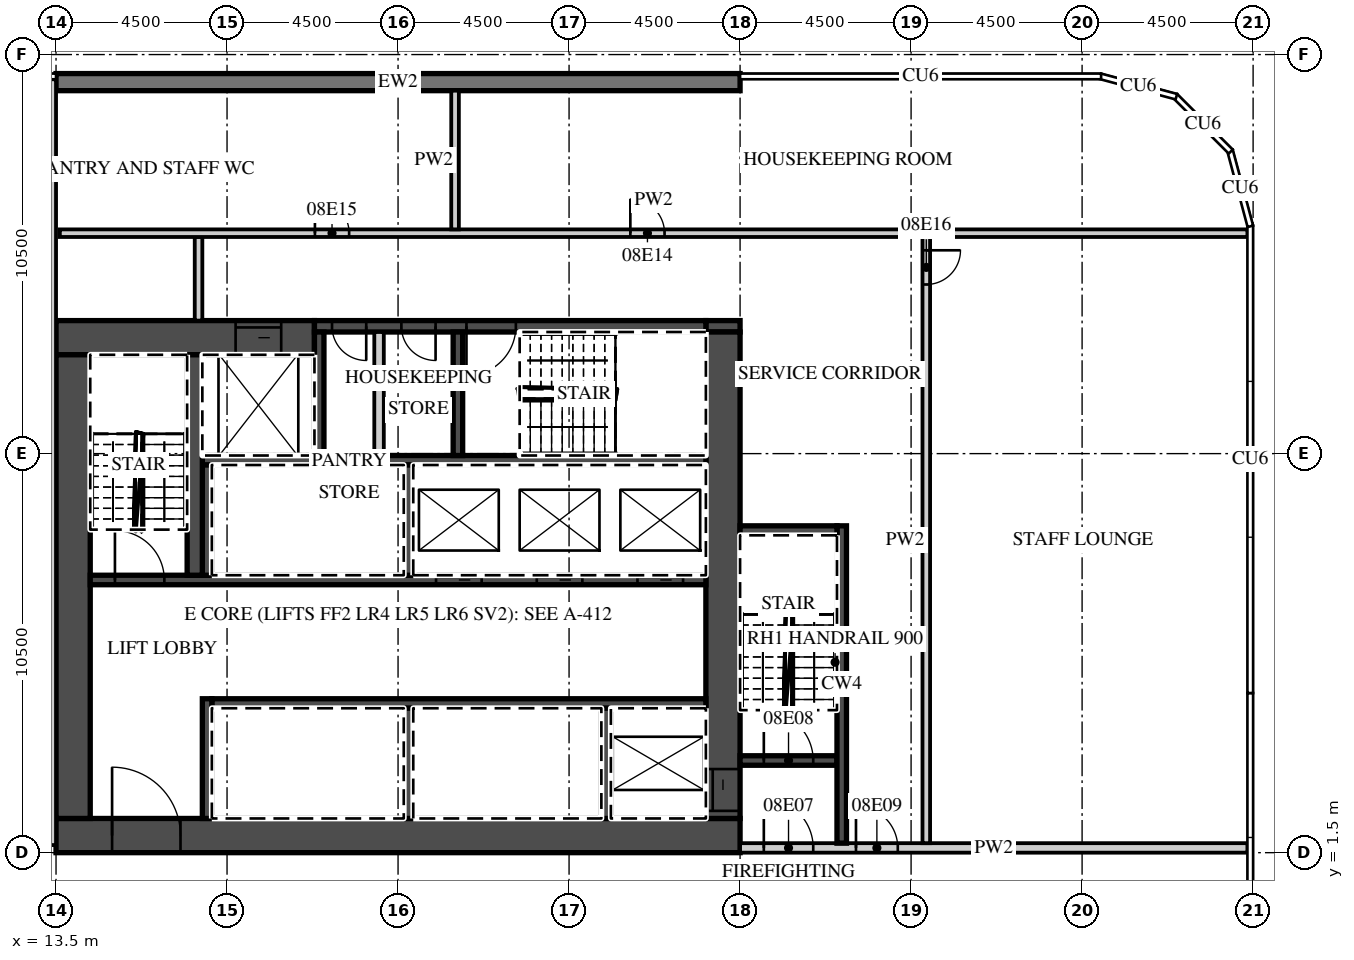
"""IFC4 building model, lengths in metres.
Left out: names, types, materials, properties, quantities, classifications, styles, units other than length and angle.
Written with IfcOpenShell. Run it as: python <this file> out.ifc"""

import sys

from ifc_helpers import new_model, si_unit, direction, frame, frame_2d, origin, place, context, subcontext, project, spatial, rectangle, extrude, element, fill, save


model = new_model("IFC4")
c1 = context("Model", 3, precision=1e-05, world=origin(), true_north=direction((0.0, 1.0)))
c2 = subcontext(c1, "Body", "Model", "MODEL_VIEW")
j1 = project(units=[si_unit("LENGTHUNIT", "METRE"), si_unit("PLANEANGLEUNIT", "RADIAN")], contexts=[c1])
p1 = place(None, origin())
s1 = spatial("IfcSite", under=j1, at=p1, CompositionType="ELEMENT")
p2 = place(p1, origin())
s2 = spatial("IfcBuilding", under=s1, at=p2, CompositionType="ELEMENT")
p3 = place(p2, frame((0.0, 0.0, 53.0)))
s3 = spatial("IfcBuildingStorey", under=s2, at=p3, CompositionType="ELEMENT", Elevation=53.0)
p4 = place(p3, frame((31.5, 21.775, 0.0), z_axis=(0.0, 0.0, 1.0), x_axis=(-1.0, 0.0, 0.0)))
e1 = element("IfcWall", 1, at=p4, inside=s3, PredefinedType="SOLIDWALL", context=c2, shape_type="SweptSolid", body=[
    extrude(rectangle(XDim=18.0, YDim=0.45, at=frame_2d((9.0, 0.0))), origin(), (0.0, 0.0, 1.0), 6.72),
])
p5 = place(p3, frame((13.5, 1.95, 0.0), z_axis=(0.0, 0.0, 1.0), x_axis=(1.0, 0.0, 0.0)))
e2 = element("IfcWall", 2, at=p5, inside=s3, PredefinedType="SHEAR", context=c2, shape_type="SweptSolid", body=[
    extrude(rectangle(XDim=18.0, YDim=0.9, at=frame_2d((9.0, 0.0))), origin(), (0.0, 0.0, 1.0), 6.72),
])
p6 = place(p5, frame((1.475, 0.0, 0.0)))
e3 = element("IfcOpeningElement", 3, at=p6, cuts=e2, PredefinedType="OPENING", context=c2, shape_type="SweptSolid", body=[
    extrude(rectangle(XDim=1.8, YDim=2.1, at=frame_2d((0.9, 1.05))), frame((0.0, 0.46, 0.0), z_axis=(0.0, -1.0, 0.0), x_axis=(1.0, 0.0, 0.0)), (0.0, 0.0, 1.0), 0.92),
])
p7 = place(p3, frame((13.5, 15.05, 0.0), z_axis=(0.0, 0.0, 1.0), x_axis=(1.0, 0.0, 0.0)))
e4 = element("IfcWall", 4, at=p7, inside=s3, PredefinedType="SHEAR", context=c2, shape_type="SweptSolid", body=[
    extrude(rectangle(XDim=6.8, YDim=0.9, at=frame_2d((3.4, 0.0))), origin(), (0.0, 0.0, 1.0), 6.72),
])
p8 = place(p7, frame((4.725, 0.0, 0.0)))
e5 = element("IfcOpeningElement", 5, at=p8, cuts=e4, PredefinedType="OPENING", context=c2, shape_type="SweptSolid", body=[
    extrude(rectangle(XDim=1.2, YDim=2.1, at=frame_2d((0.6, 1.05))), frame((0.0, 0.46, 0.0), z_axis=(0.0, -1.0, 0.0), x_axis=(1.0, 0.0, 0.0)), (0.0, 0.0, 1.0), 0.92),
])
p9 = place(p3, frame((30.6, 15.35, 0.0), z_axis=(0.0, 0.0, 1.0), x_axis=(1.0, 0.0, 0.0)))
e6 = element("IfcWall", 6, at=p9, inside=s3, PredefinedType="SHEAR", context=c2, shape_type="SweptSolid", body=[
    extrude(rectangle(XDim=0.9, YDim=0.3, at=frame_2d((0.45, 0.0))), origin(), (0.0, 0.0, 1.0), 6.72),
])
p10 = place(p3, frame((20.3, 15.35, 0.0), z_axis=(0.0, 0.0, 1.0), x_axis=(1.0, 0.0, 0.0)))
e7 = element("IfcWall", 7, at=p10, inside=s3, PredefinedType="SHEAR", context=c2, shape_type="SweptSolid", body=[
    extrude(rectangle(XDim=10.3, YDim=0.3, at=frame_2d((5.15, 0.0))), origin(), (0.0, 0.0, 1.0), 6.72),
])
p11 = place(p10, frame((4.0, 0.0, 0.0)))
e8 = element("IfcOpeningElement", 8, at=p11, cuts=e7, PredefinedType="OPENING", context=c2, shape_type="SweptSolid", body=[
    extrude(rectangle(XDim=1.3, YDim=2.1, at=frame_2d((0.65, 1.05))), frame((0.0, 0.16, 0.0), z_axis=(0.0, -1.0, 0.0), x_axis=(1.0, 0.0, 0.0)), (0.0, 0.0, 1.0), 0.32),
])
p12 = place(p10, frame((2.288, 0.0, 0.0)))
e9 = element("IfcOpeningElement", 9, at=p12, cuts=e7, PredefinedType="OPENING", context=c2, shape_type="SweptSolid", body=[
    extrude(rectangle(XDim=0.9, YDim=2.1, at=frame_2d((0.45, 1.05))), frame((0.0, 0.16, 0.0), z_axis=(0.0, -1.0, 0.0), x_axis=(1.0, 0.0, 0.0)), (0.0, 0.0, 1.0), 0.32),
])
p13 = place(p10, frame((0.462, 0.0, 0.0)))
e10 = element("IfcOpeningElement", 10, at=p13, cuts=e7, PredefinedType="OPENING", context=c2, shape_type="SweptSolid", body=[
    extrude(rectangle(XDim=0.9, YDim=2.1, at=frame_2d((0.45, 1.05))), frame((0.0, 0.16, 0.0), z_axis=(0.0, -1.0, 0.0), x_axis=(1.0, 0.0, 0.0)), (0.0, 0.0, 1.0), 0.32),
])
p14 = place(p3, frame((31.05, 2.4, 0.0), z_axis=(0.0, 0.0, 1.0), x_axis=(0.0, 1.0, 0.0)))
e11 = element("IfcWall", 11, at=p14, inside=s3, PredefinedType="SHEAR", context=c2, shape_type="SweptSolid", body=[
    extrude(rectangle(XDim=12.8, YDim=0.9, at=frame_2d((6.4, 0.0))), origin(), (0.0, 0.0, 1.0), 6.72),
])
p15 = place(p14, frame((0.2, 0.0, 0.0)))
e12 = element("IfcOpeningElement", 12, at=p15, cuts=e11, PredefinedType="OPENING", context=c2, shape_type="SweptSolid", body=[
    extrude(rectangle(XDim=1.1, YDim=2.1, at=frame_2d((0.55, 1.05))), frame((0.0, 0.46, 0.0), z_axis=(0.0, -1.0, 0.0), x_axis=(1.0, 0.0, 0.0)), (0.0, 0.0, 1.0), 0.92),
])
p16 = place(p3, frame((13.95, 2.4, 0.0), z_axis=(0.0, 0.0, 1.0), x_axis=(0.0, 1.0, 0.0)))
e13 = element("IfcWall", 13, at=p16, inside=s3, PredefinedType="SHEAR", context=c2, shape_type="SweptSolid", body=[
    extrude(rectangle(XDim=12.2, YDim=0.9, at=frame_2d((6.1, 0.0))), origin(), (0.0, 0.0, 1.0), 6.72),
])
p17 = place(p3, frame((17.6, 5.425, 0.0), z_axis=(0.0, 0.0, 1.0), x_axis=(1.0, 0.0, 0.0)))
e14 = element("IfcWall", 14, at=p17, inside=s3, PredefinedType="SHEAR", context=c2, shape_type="SweptSolid", body=[
    extrude(rectangle(XDim=13.0, YDim=0.25, at=frame_2d((6.5, 0.0))), origin(), (0.0, 0.0, 1.0), 6.72),
])
p18 = place(p3, frame((17.475, 2.4, 0.0), z_axis=(0.0, 0.0, 1.0), x_axis=(0.0, 1.0, 0.0)))
e15 = element("IfcWall", 15, at=p18, inside=s3, PredefinedType="SHEAR", context=c2, shape_type="SweptSolid", body=[
    extrude(rectangle(XDim=3.15, YDim=0.25, at=frame_2d((1.575, 0.0))), origin(), (0.0, 0.0, 1.0), 6.72),
])
for number, where, z_axis, x_axis in (
    (16, (27.975, 2.4, 0.0), (0.0, 0.0, 1.0), (0.0, 1.0, 0.0)),
    (17, (22.775, 2.4, 0.0), (0.0, 0.0, 1.0), (0.0, 1.0, 0.0)),
):
    element("IfcWall", number, at=place(p3, frame(where, z_axis=z_axis, x_axis=x_axis)), inside=s3, PredefinedType="SHEAR", context=c2, shape_type="SweptSolid", body=[
        extrude(rectangle(XDim=2.9, YDim=0.25, at=frame_2d((1.45, 0.0))), origin(), (0.0, 0.0, 1.0), 6.72),
    ])
p19 = place(p3, frame((14.4, 8.675, 0.0), z_axis=(0.0, 0.0, 1.0), x_axis=(1.0, 0.0, 0.0)))
e18 = element("IfcWall", 18, at=p19, inside=s3, PredefinedType="SHEAR", context=c2, shape_type="SweptSolid", body=[
    extrude(rectangle(XDim=16.2, YDim=0.25, at=frame_2d((8.1, 0.0))), origin(), (0.0, 0.0, 1.0), 6.72),
])
p20 = place(p19, frame((14.4, 0.0, 0.0)))
e19 = element("IfcOpeningElement", 19, at=p20, cuts=e18, PredefinedType="OPENING", context=c2, shape_type="SweptSolid", body=[
    extrude(rectangle(XDim=1.2, YDim=2.1, at=frame_2d((0.6, 1.05))), frame((0.0, 0.135, 0.0), z_axis=(0.0, -1.0, 0.0), x_axis=(1.0, 0.0, 0.0)), (0.0, 0.0, 1.0), 0.27),
])
p21 = place(p19, frame((11.75, 0.0, 0.0)))
e20 = element("IfcOpeningElement", 20, at=p21, cuts=e18, PredefinedType="OPENING", context=c2, shape_type="SweptSolid", body=[
    extrude(rectangle(XDim=1.2, YDim=2.1, at=frame_2d((0.6, 1.05))), frame((0.0, 0.135, 0.0), z_axis=(0.0, -1.0, 0.0), x_axis=(1.0, 0.0, 0.0)), (0.0, 0.0, 1.0), 0.27),
])
p22 = place(p19, frame((9.1, 0.0, 0.0)))
e21 = element("IfcOpeningElement", 21, at=p22, cuts=e18, PredefinedType="OPENING", context=c2, shape_type="SweptSolid", body=[
    extrude(rectangle(XDim=1.2, YDim=2.1, at=frame_2d((0.6, 1.05))), frame((0.0, 0.135, 0.0), z_axis=(0.0, -1.0, 0.0), x_axis=(1.0, 0.0, 0.0)), (0.0, 0.0, 1.0), 0.27),
])
p23 = place(p19, frame((0.65, 0.0, 0.0)))
e22 = element("IfcOpeningElement", 22, at=p23, cuts=e18, PredefinedType="OPENING", context=c2, shape_type="SweptSolid", body=[
    extrude(rectangle(XDim=1.3, YDim=2.1, at=frame_2d((0.65, 1.05))), frame((0.0, 0.135, 0.0), z_axis=(0.0, -1.0, 0.0), x_axis=(1.0, 0.0, 0.0)), (0.0, 0.0, 1.0), 0.27),
])
p24 = place(p3, frame((17.35, 11.825, 0.0), z_axis=(0.0, 0.0, 1.0), x_axis=(1.0, 0.0, 0.0)))
e23 = element("IfcWall", 23, at=p24, inside=s3, PredefinedType="SHEAR", context=c2, shape_type="SweptSolid", body=[
    extrude(rectangle(XDim=13.25, YDim=0.25, at=frame_2d((6.625, 0.0))), origin(), (0.0, 0.0, 1.0), 6.72),
])
for number, where, z_axis, x_axis in (
    (24, (17.475, 8.8, 0.0), (0.0, 0.0, 1.0), (0.0, 1.0, 0.0)),
    (25, (22.775, 8.8, 0.0), (0.0, 0.0, 1.0), (0.0, 1.0, 0.0)),
):
    element("IfcWall", number, at=place(p3, frame(where, z_axis=z_axis, x_axis=x_axis)), inside=s3, PredefinedType="SHEAR", context=c2, shape_type="SweptSolid", body=[
        extrude(rectangle(XDim=2.9, YDim=0.25, at=frame_2d((1.45, 0.0))), origin(), (0.0, 0.0, 1.0), 6.72),
    ])
p25 = place(p3, frame((17.15, 8.8, 0.0), z_axis=(0.0, 0.0, 1.0), x_axis=(0.0, 1.0, 0.0)))
e26 = element("IfcWall", 26, at=p25, inside=s3, PredefinedType="SHEAR", context=c2, shape_type="SweptSolid", body=[
    extrude(rectangle(XDim=5.8, YDim=0.4, at=frame_2d((2.9, 0.0))), origin(), (0.0, 0.0, 1.0), 6.72),
])
for number, where, z_axis, x_axis in (
    (27, (20.425, 11.95, 0.0), (0.0, 0.0, 1.0), (0.0, 1.0, 0.0)),
    (28, (24.075, 11.95, 0.0), (0.0, 0.0, 1.0), (0.0, 1.0, 0.0)),
):
    element("IfcWall", number, at=place(p3, frame(where, z_axis=z_axis, x_axis=x_axis)), inside=s3, PredefinedType="SHEAR", context=c2, shape_type="SweptSolid", body=[
        extrude(rectangle(XDim=3.25, YDim=0.25, at=frame_2d((1.625, 0.0))), origin(), (0.0, 0.0, 1.0), 6.72),
    ])
p26 = place(p3, frame((22.0, 11.95, 0.0), z_axis=(0.0, 0.0, 1.0), x_axis=(0.0, 1.0, 0.0)))
e29 = element("IfcWall", 29, at=p26, inside=s3, PredefinedType="PARTITIONING", context=c2, shape_type="SweptSolid", body=[
    extrude(rectangle(XDim=3.25, YDim=0.25, at=frame_2d((1.625, 0.0))), origin(), (0.0, 0.0, 1.0), 6.72),
])
p27 = place(p3, frame((31.5, 1.625, 0.0), z_axis=(0.0, 0.0, 1.0), x_axis=(1.0, 0.0, 0.0)))
e30 = element("IfcWall", 30, at=p27, inside=s3, PredefinedType="PARTITIONING", context=c2, shape_type="SweptSolid", body=[
    extrude(rectangle(XDim=13.35, YDim=0.25, at=frame_2d((6.675, 0.0))), origin(), (0.0, 0.0, 1.0), 6.72),
])
p28 = place(p27, frame((0.625, 0.0, 0.0)))
e31 = element("IfcOpeningElement", 31, at=p28, cuts=e30, PredefinedType="OPENING", context=c2, shape_type="SweptSolid", body=[
    extrude(rectangle(XDim=1.3, YDim=2.1, at=frame_2d((0.65, 1.05))), frame((0.0, 0.135, 0.0), z_axis=(0.0, -1.0, 0.0), x_axis=(1.0, 0.0, 0.0)), (0.0, 0.0, 1.0), 0.27),
])
p29 = place(p27, frame((3.05, 0.0, 0.0)))
e32 = element("IfcOpeningElement", 32, at=p29, cuts=e30, PredefinedType="OPENING", context=c2, shape_type="SweptSolid", body=[
    extrude(rectangle(XDim=1.1, YDim=2.1, at=frame_2d((0.55, 1.05))), frame((0.0, 0.135, 0.0), z_axis=(0.0, -1.0, 0.0), x_axis=(1.0, 0.0, 0.0)), (0.0, 0.0, 1.0), 0.27),
])
p30 = place(p3, frame((31.5, 3.925, 0.0), z_axis=(0.0, 0.0, 1.0), x_axis=(1.0, 0.0, 0.0)))
e33 = element("IfcWall", 33, at=p30, inside=s3, PredefinedType="SHEAR", context=c2, shape_type="SweptSolid", body=[
    extrude(rectangle(XDim=2.55, YDim=0.25, at=frame_2d((1.275, 0.0))), origin(), (0.0, 0.0, 1.0), 6.72),
])
p31 = place(p30, frame((0.625, 0.0, 0.0)))
e34 = element("IfcOpeningElement", 34, at=p31, cuts=e33, PredefinedType="OPENING", context=c2, shape_type="SweptSolid", body=[
    extrude(rectangle(XDim=1.3, YDim=2.1, at=frame_2d((0.65, 1.05))), frame((0.0, 0.135, 0.0), z_axis=(0.0, -1.0, 0.0), x_axis=(1.0, 0.0, 0.0)), (0.0, 0.0, 1.0), 0.27),
])
p32 = place(p3, frame((34.175, 1.75, 0.0), z_axis=(0.0, 0.0, 1.0), x_axis=(0.0, 1.0, 0.0)))
e35 = element("IfcWall", 35, at=p32, inside=s3, PredefinedType="SHEAR", context=c2, shape_type="SweptSolid", body=[
    extrude(rectangle(XDim=8.35, YDim=0.25, at=frame_2d((4.175, 0.0))), origin(), (0.0, 0.0, 1.0), 6.72),
])
p33 = place(p3, frame((31.5, 9.975, 0.0), z_axis=(0.0, 0.0, 1.0), x_axis=(1.0, 0.0, 0.0)))
e36 = element("IfcWall", 36, at=p33, inside=s3, PredefinedType="SHEAR", context=c2, shape_type="SweptSolid", body=[
    extrude(rectangle(XDim=2.55, YDim=0.25, at=frame_2d((1.275, 0.0))), origin(), (0.0, 0.0, 1.0), 6.72),
])
p34 = place(p3, frame((17.25, 15.5, 0.0), z_axis=(0.0, 0.0, 1.0), x_axis=(0.0, 1.0, 0.0)))
e37 = element("IfcWall", 37, at=p34, inside=s3, PredefinedType="PARTITIONING", context=c2, shape_type="SweptSolid", body=[
    extrude(rectangle(XDim=2.2, YDim=0.2, at=frame_2d((1.1, 0.0))), origin(), (0.0, 0.0, 1.0), 6.72),
])
p35 = place(p3, frame((36.4, 1.75, 0.0), z_axis=(0.0, 0.0, 1.0), x_axis=(0.0, 1.0, 0.0)))
e38 = element("IfcWall", 38, at=p35, inside=s3, PredefinedType="PARTITIONING", context=c2, shape_type="SweptSolid", body=[
    extrude(rectangle(XDim=15.95, YDim=0.2, at=frame_2d((7.975, 0.0))), origin(), (0.0, 0.0, 1.0), 6.72),
])
p36 = place(p35, frame((14.7, 0.0, 0.0)))
e39 = element("IfcOpeningElement", 39, at=p36, cuts=e38, PredefinedType="OPENING", context=c2, shape_type="SweptSolid", body=[
    extrude(rectangle(XDim=0.9, YDim=2.1, at=frame_2d((0.45, 1.05))), frame((0.0, 0.11, 0.0), z_axis=(0.0, -1.0, 0.0), x_axis=(1.0, 0.0, 0.0)), (0.0, 0.0, 1.0), 0.22),
])
p37 = place(p3, frame((13.6, 17.8, 0.0), z_axis=(0.0, 0.0, 1.0), x_axis=(1.0, 0.0, 0.0)))
e40 = element("IfcWall", 40, at=p37, inside=s3, PredefinedType="PARTITIONING", context=c2, shape_type="SweptSolid", body=[
    extrude(rectangle(XDim=31.25, YDim=0.2, at=frame_2d((15.625, 0.0))), origin(), (0.0, 0.0, 1.0), 6.72),
])
p38 = place(p37, frame((15.012, 0.0, 0.0)))
e41 = element("IfcOpeningElement", 41, at=p38, cuts=e40, PredefinedType="OPENING", context=c2, shape_type="SweptSolid", body=[
    extrude(rectangle(XDim=0.9, YDim=2.1, at=frame_2d((0.45, 1.05))), frame((0.0, 0.11, 0.0), z_axis=(0.0, -1.0, 0.0), x_axis=(1.0, 0.0, 0.0)), (0.0, 0.0, 1.0), 0.22),
])
p39 = place(p37, frame((6.712, 0.0, 0.0)))
e42 = element("IfcOpeningElement", 42, at=p39, cuts=e40, PredefinedType="OPENING", context=c2, shape_type="SweptSolid", body=[
    extrude(rectangle(XDim=0.9, YDim=2.1, at=frame_2d((0.45, 1.05))), frame((0.0, 0.11, 0.0), z_axis=(0.0, -1.0, 0.0), x_axis=(1.0, 0.0, 0.0)), (0.0, 0.0, 1.0), 0.22),
])
p40 = place(p3, frame((24.0, 17.9, 0.0), z_axis=(0.0, 0.0, 1.0), x_axis=(0.0, 1.0, 0.0)))
e43 = element("IfcWall", 43, at=p40, inside=s3, PredefinedType="PARTITIONING", context=c2, shape_type="SweptSolid", body=[
    extrude(rectangle(XDim=3.65, YDim=0.2, at=frame_2d((1.825, 0.0))), origin(), (0.0, 0.0, 1.0), 6.72),
])
p41 = place(p3, frame((13.4, 1.7, 0.0), z_axis=(0.0, 0.0, 1.0), x_axis=(0.0, 1.0, 0.0)))
e44 = element("IfcWall", 44, at=p41, inside=s3, PredefinedType="PARTITIONING", context=c2, shape_type="SweptSolid", body=[
    extrude(rectangle(XDim=20.15, YDim=0.2, at=frame_2d((10.075, 0.0))), origin(), (0.0, 0.0, 1.0), 6.72),
])
p42 = place(p20, origin())
e45 = element("IfcDoor", 45, at=p42, inside=s3, OperationType="SLIDING_TO_LEFT", PredefinedType="DOOR", context=c2, shape_type="SweptSolid", body=[
    extrude(rectangle(XDim=1.2, YDim=2.1, at=frame_2d((0.6, 1.05))), frame((0.0, 0.025, 0.0), z_axis=(0.0, -1.0, 0.0), x_axis=(1.0, 0.0, 0.0)), (0.0, 0.0, 1.0), 0.05),
])
fill(e19, e45)
p43 = place(p21, origin())
e46 = element("IfcDoor", 46, at=p43, inside=s3, OperationType="SLIDING_TO_RIGHT", PredefinedType="DOOR", context=c2, shape_type="SweptSolid", body=[
    extrude(rectangle(XDim=1.2, YDim=2.1, at=frame_2d((0.6, 1.05))), frame((0.0, 0.025, 0.0), z_axis=(0.0, -1.0, 0.0), x_axis=(1.0, 0.0, 0.0)), (0.0, 0.0, 1.0), 0.05),
])
fill(e20, e46)
p44 = place(p22, origin())
e47 = element("IfcDoor", 47, at=p44, inside=s3, OperationType="SLIDING_TO_RIGHT", PredefinedType="DOOR", context=c2, shape_type="SweptSolid", body=[
    extrude(rectangle(XDim=1.2, YDim=2.1, at=frame_2d((0.6, 1.05))), frame((0.0, 0.025, 0.0), z_axis=(0.0, -1.0, 0.0), x_axis=(1.0, 0.0, 0.0)), (0.0, 0.0, 1.0), 0.05),
])
fill(e21, e47)
p45 = place(p8, origin())
e48 = element("IfcDoor", 48, at=p45, inside=s3, OperationType="SLIDING_TO_LEFT", PredefinedType="DOOR", context=c2, shape_type="SweptSolid", body=[
    extrude(rectangle(XDim=1.2, YDim=2.1, at=frame_2d((0.6, 1.05))), frame((0.0, 0.025, 0.0), z_axis=(0.0, -1.0, 0.0), x_axis=(1.0, 0.0, 0.0)), (0.0, 0.0, 1.0), 0.05),
])
fill(e5, e48)
p46 = place(p15, origin())
e49 = element("IfcDoor", 49, at=p46, inside=s3, OperationType="SLIDING_TO_LEFT", PredefinedType="DOOR", context=c2, shape_type="SweptSolid", body=[
    extrude(rectangle(XDim=1.1, YDim=2.1, at=frame_2d((0.55, 1.05))), frame((0.0, 0.025, 0.0), z_axis=(0.0, -1.0, 0.0), x_axis=(1.0, 0.0, 0.0)), (0.0, 0.0, 1.0), 0.05),
])
fill(e12, e49)
p47 = place(p6, origin())
e50 = element("IfcDoor", 50, at=p47, inside=s3, OperationType="DOUBLE_DOOR_DOUBLE_SWING", PredefinedType="DOOR", context=c2, shape_type="SweptSolid", body=[
    extrude(rectangle(XDim=1.8, YDim=2.1, at=frame_2d((0.9, 1.05))), frame((0.0, 0.025, 0.0), z_axis=(0.0, -1.0, 0.0), x_axis=(1.0, 0.0, 0.0)), (0.0, 0.0, 1.0), 0.05),
])
fill(e3, e50)
p48 = place(p28, origin())
e51 = element("IfcDoor", 51, at=p48, inside=s3, OperationType="SINGLE_SWING_LEFT", PredefinedType="DOOR", context=c2, shape_type="SweptSolid", body=[
    extrude(rectangle(XDim=1.3, YDim=2.1, at=frame_2d((0.65, 1.05))), frame((0.0, 0.025, 0.0), z_axis=(0.0, -1.0, 0.0), x_axis=(1.0, 0.0, 0.0)), (0.0, 0.0, 1.0), 0.05),
])
fill(e31, e51)
p49 = place(p31, origin())
e52 = element("IfcDoor", 52, at=p49, inside=s3, OperationType="SINGLE_SWING_LEFT", PredefinedType="DOOR", context=c2, shape_type="SweptSolid", body=[
    extrude(rectangle(XDim=1.3, YDim=2.1, at=frame_2d((0.65, 1.05))), frame((0.0, 0.025, 0.0), z_axis=(0.0, -1.0, 0.0), x_axis=(1.0, 0.0, 0.0)), (0.0, 0.0, 1.0), 0.05),
])
fill(e34, e52)
p50 = place(p29, origin())
e53 = element("IfcDoor", 53, at=p50, inside=s3, OperationType="SINGLE_SWING_LEFT", PredefinedType="DOOR", context=c2, shape_type="SweptSolid", body=[
    extrude(rectangle(XDim=1.1, YDim=2.1, at=frame_2d((0.55, 1.05))), frame((0.0, 0.025, 0.0), z_axis=(0.0, -1.0, 0.0), x_axis=(1.0, 0.0, 0.0)), (0.0, 0.0, 1.0), 0.05),
])
fill(e32, e53)
p51 = place(p23, origin())
e54 = element("IfcDoor", 54, at=p51, inside=s3, OperationType="SINGLE_SWING_LEFT", PredefinedType="DOOR", context=c2, shape_type="SweptSolid", body=[
    extrude(rectangle(XDim=1.3, YDim=2.1, at=frame_2d((0.65, 1.05))), frame((0.0, 0.025, 0.0), z_axis=(0.0, -1.0, 0.0), x_axis=(1.0, 0.0, 0.0)), (0.0, 0.0, 1.0), 0.05),
])
fill(e22, e54)
p52 = place(p11, origin())
e55 = element("IfcDoor", 55, at=p52, inside=s3, OperationType="SINGLE_SWING_LEFT", PredefinedType="DOOR", context=c2, shape_type="SweptSolid", body=[
    extrude(rectangle(XDim=1.3, YDim=2.1, at=frame_2d((0.65, 1.05))), frame((0.0, 0.025, 0.0), z_axis=(0.0, -1.0, 0.0), x_axis=(1.0, 0.0, 0.0)), (0.0, 0.0, 1.0), 0.05),
])
fill(e8, e55)
p53 = place(p12, origin())
e56 = element("IfcDoor", 56, at=p53, inside=s3, OperationType="SINGLE_SWING_RIGHT", PredefinedType="DOOR", context=c2, shape_type="SweptSolid", body=[
    extrude(rectangle(XDim=0.9, YDim=2.1, at=frame_2d((0.45, 1.05))), frame((0.0, 0.025, 0.0), z_axis=(0.0, -1.0, 0.0), x_axis=(1.0, 0.0, 0.0)), (0.0, 0.0, 1.0), 0.05),
])
fill(e9, e56)
p54 = place(p13, origin())
e57 = element("IfcDoor", 57, at=p54, inside=s3, OperationType="SINGLE_SWING_RIGHT", PredefinedType="DOOR", context=c2, shape_type="SweptSolid", body=[
    extrude(rectangle(XDim=0.9, YDim=2.1, at=frame_2d((0.45, 1.05))), frame((0.0, 0.025, 0.0), z_axis=(0.0, -1.0, 0.0), x_axis=(1.0, 0.0, 0.0)), (0.0, 0.0, 1.0), 0.05),
])
fill(e10, e57)
p55 = place(p38, origin())
e58 = element("IfcDoor", 58, at=p55, inside=s3, OperationType="SINGLE_SWING_LEFT", PredefinedType="DOOR", context=c2, shape_type="SweptSolid", body=[
    extrude(rectangle(XDim=0.9, YDim=2.1, at=frame_2d((0.45, 1.05))), frame((0.0, 0.025, 0.0), z_axis=(0.0, -1.0, 0.0), x_axis=(1.0, 0.0, 0.0)), (0.0, 0.0, 1.0), 0.05),
])
fill(e41, e58)
p56 = place(p39, origin())
e59 = element("IfcDoor", 59, at=p56, inside=s3, OperationType="SINGLE_SWING_LEFT", PredefinedType="DOOR", context=c2, shape_type="SweptSolid", body=[
    extrude(rectangle(XDim=0.9, YDim=2.1, at=frame_2d((0.45, 1.05))), frame((0.0, 0.025, 0.0), z_axis=(0.0, -1.0, 0.0), x_axis=(1.0, 0.0, 0.0)), (0.0, 0.0, 1.0), 0.05),
])
fill(e42, e59)
p57 = place(p36, origin())
e60 = element("IfcDoor", 60, at=p57, inside=s3, OperationType="SINGLE_SWING_RIGHT", PredefinedType="DOOR", context=c2, shape_type="SweptSolid", body=[
    extrude(rectangle(XDim=0.9, YDim=2.1, at=frame_2d((0.45, 1.05))), frame((0.0, 0.025, 0.0), z_axis=(0.0, -1.0, 0.0), x_axis=(1.0, 0.0, 0.0)), (0.0, 0.0, 1.0), 0.05),
])
fill(e39, e60)
save(model, sys.argv[1])
